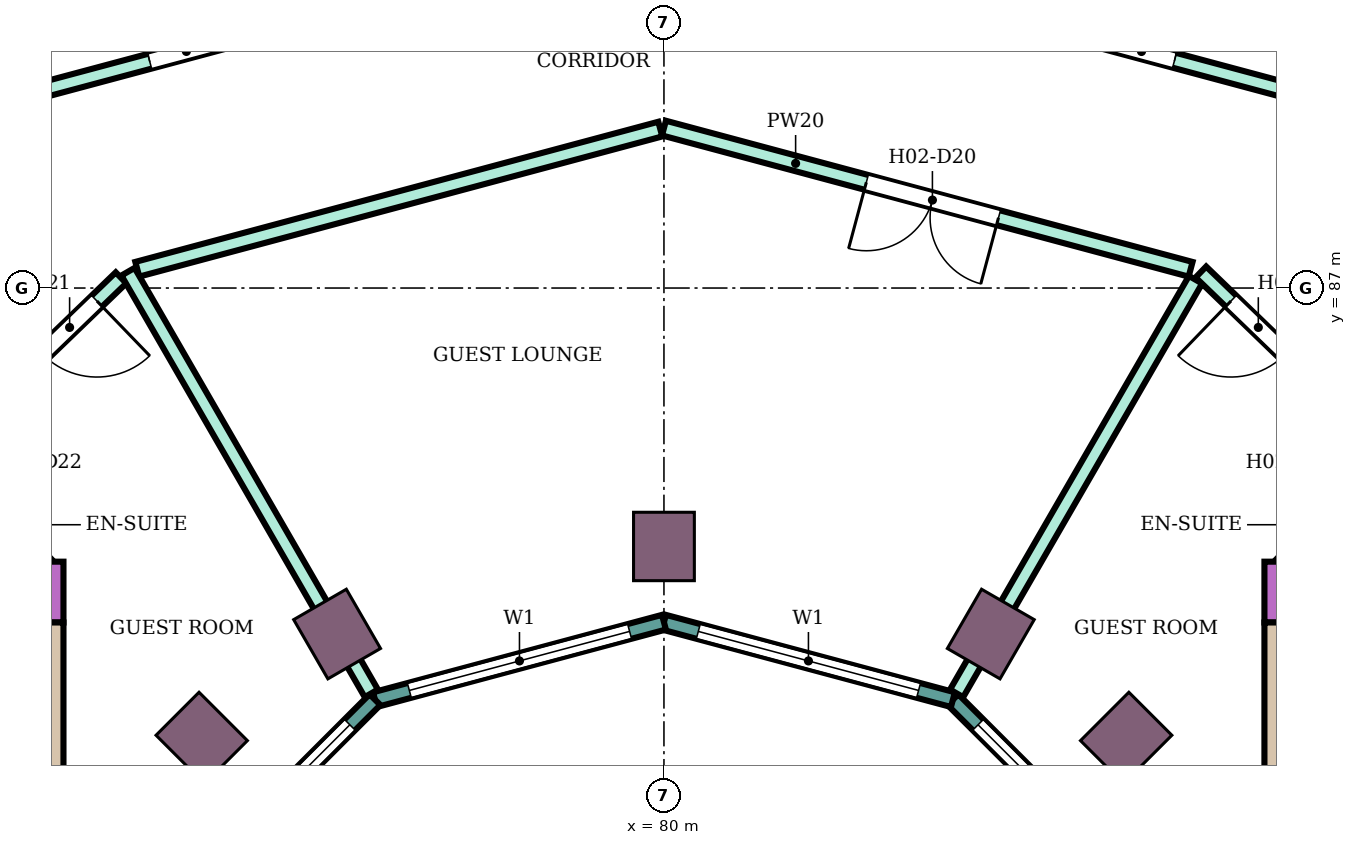
"""IFC4 building model, lengths in metres.
Left out: names, types, materials, properties, quantities, classifications, styles, units other than length and angle.
Written with IfcOpenShell. Run it as: python <this file> out.ifc"""

import sys

from ifc_helpers import new_model, si_unit, direction, frame, frame_2d, origin, origin_2d, place, context, subcontext, project, spatial, rectangle, extrude, element, fill, save


model = new_model("IFC4")
c1 = context("Model", 3, precision=1e-05, world=origin(), true_north=direction((0.0, 1.0)))
c2 = subcontext(c1, "Body", "Model", "MODEL_VIEW")
j1 = project(units=[si_unit("LENGTHUNIT", "METRE"), si_unit("PLANEANGLEUNIT", "RADIAN")], contexts=[c1])
p1 = place(None, origin())
s1 = spatial("IfcSite", under=j1, at=p1, CompositionType="ELEMENT")
p2 = place(p1, origin())
s2 = spatial("IfcBuilding", under=s1, at=p2, CompositionType="ELEMENT")
p3 = place(p2, frame((0.0, 0.0, 47.8)))
s3 = spatial("IfcBuildingStorey", under=s2, at=p3, CompositionType="ELEMENT", Elevation=47.8)
for number, where, z_axis, x_axis in (
    (1, (86.081, 81.081, 0.0), (0.0, 0.0, 1.0), (0.707, 0.707, 0.0)),
    (2, (84.3, 82.448, 0.0), (0.0, 0.0, 1.0), (0.5, 0.866, 0.0)),
    (3, (80.0, 83.6, 0.0), (0.0, 0.0, 1.0), (0.0, 1.0, 0.0)),
    (4, (75.7, 82.448, 0.0), (0.0, 0.0, 1.0), (-0.5, 0.866, 0.0)),
    (5, (73.919, 81.081, 0.0), (0.0, 0.0, 1.0), (-0.707, 0.707, 0.0)),
):
    element("IfcColumn", number, at=place(p3, frame(where, z_axis=z_axis, x_axis=x_axis)), inside=s3, PredefinedType="COLUMN", context=c2, shape_type="SweptSolid", body=[
        extrude(rectangle(XDim=0.9, YDim=0.8, at=origin_2d()), origin(), (0.0, 0.0, 1.0), 3.8),
    ])
p4 = place(p3, frame((87.9, 83.0, 0.0), z_axis=(0.0, 0.0, 1.0), x_axis=(1.0, 0.0, 0.0)))
e6 = element("IfcWall", 6, at=p4, inside=s3, PredefinedType="SHEAR", context=c2, shape_type="SweptSolid", body=[
    extrude(rectangle(XDim=14.7, YDim=0.8, at=frame_2d((7.35, 0.0))), origin(), (0.0, 0.0, 1.0), 3.48),
])
p5 = place(p4, frame((4.2, 0.0, 0.0)))
e7 = element("IfcOpeningElement", 7, at=p5, cuts=e6, PredefinedType="OPENING", context=c2, shape_type="SweptSolid", body=[
    extrude(rectangle(XDim=2.4, YDim=2.4, at=frame_2d((1.2, 1.2))), frame((0.0, 0.41, 0.0), z_axis=(0.0, -1.0, 0.0), x_axis=(1.0, 0.0, 0.0)), (0.0, 0.0, 1.0), 0.82),
])
p6 = place(p3, frame((88.125, 75.0, 0.0), z_axis=(0.0, 0.0, 1.0), x_axis=(0.0, 1.0, 0.0)))
e8 = element("IfcWall", 8, at=p6, inside=s3, PredefinedType="SHEAR", context=c2, shape_type="SweptSolid", body=[
    extrude(rectangle(XDim=7.6, YDim=0.45, at=frame_2d((3.8, 0.0))), origin(), (0.0, 0.0, 1.0), 3.48),
])
p7 = place(p3, frame((72.1, 83.0, 0.0), z_axis=(0.0, 0.0, 1.0), x_axis=(-1.0, 0.0, 0.0)))
e9 = element("IfcWall", 9, at=p7, inside=s3, PredefinedType="SHEAR", context=c2, shape_type="SweptSolid", body=[
    extrude(rectangle(XDim=14.7, YDim=0.8, at=frame_2d((7.35, 0.0))), origin(), (0.0, 0.0, 1.0), 3.48),
])
p8 = place(p7, frame((4.2, 0.0, 0.0)))
e10 = element("IfcOpeningElement", 10, at=p8, cuts=e9, PredefinedType="OPENING", context=c2, shape_type="SweptSolid", body=[
    extrude(rectangle(XDim=2.4, YDim=2.4, at=frame_2d((1.2, 1.2))), frame((0.0, 0.41, 0.0), z_axis=(0.0, -1.0, 0.0), x_axis=(1.0, 0.0, 0.0)), (0.0, 0.0, 1.0), 0.82),
])
p9 = place(p3, frame((71.875, 82.6, 0.0), z_axis=(0.0, 0.0, 1.0), x_axis=(0.0, -1.0, 0.0)))
e11 = element("IfcWall", 11, at=p9, inside=s3, PredefinedType="SHEAR", context=c2, shape_type="SweptSolid", body=[
    extrude(rectangle(XDim=7.6, YDim=0.45, at=frame_2d((3.8, 0.0))), origin(), (0.0, 0.0, 1.0), 3.48),
])
p10 = place(p3, frame((86.585, 78.802, 0.0), z_axis=(0.0, 0.0, 1.0), x_axis=(-0.707106781187, 0.707106781187, 0.0)))
e12 = element("IfcWall", 12, at=p10, inside=s3, PredefinedType="NOTDEFINED", context=c2, shape_type="SweptSolid", body=[
    extrude(rectangle(XDim=3.936, YDim=0.2, at=frame_2d((1.968, 0.0))), origin(), (0.0, 0.0, 1.0), 3.8),
])
p11 = place(p10, frame((0.468, 0.0, 0.9)))
e13 = element("IfcOpeningElement", 13, at=p11, cuts=e12, PredefinedType="OPENING", context=c2, shape_type="SweptSolid", body=[
    extrude(rectangle(XDim=3.0, YDim=2.3, at=frame_2d((1.5, 1.15))), frame((0.0, 0.11, 0.0), z_axis=(0.0, -1.0, 0.0), x_axis=(1.0, 0.0, 0.0)), (0.0, 0.0, 1.0), 0.22),
])
p12 = place(p3, frame((83.802, 81.585, 0.0), z_axis=(0.0, 0.0, 1.0), x_axis=(-0.965933654434, 0.258789828301, 0.0)))
e14 = element("IfcWall", 14, at=p12, inside=s3, PredefinedType="NOTDEFINED", context=c2, shape_type="SweptSolid", body=[
    extrude(rectangle(XDim=3.936, YDim=0.2, at=frame_2d((1.968, 0.0))), origin(), (0.0, 0.0, 1.0), 3.8),
])
p13 = place(p12, frame((0.468, 0.0, 0.9)))
e15 = element("IfcOpeningElement", 15, at=p13, cuts=e14, PredefinedType="OPENING", context=c2, shape_type="SweptSolid", body=[
    extrude(rectangle(XDim=3.0, YDim=2.3, at=frame_2d((1.5, 1.15))), frame((0.0, 0.11, 0.0), z_axis=(0.0, -1.0, 0.0), x_axis=(1.0, 0.0, 0.0)), (0.0, 0.0, 1.0), 0.22),
])
p14 = place(p3, frame((80.0, 82.604, 0.0), z_axis=(0.0, 0.0, 1.0), x_axis=(-0.965933654434, -0.258789828301, 0.0)))
e16 = element("IfcWall", 16, at=p14, inside=s3, PredefinedType="NOTDEFINED", context=c2, shape_type="SweptSolid", body=[
    extrude(rectangle(XDim=3.936, YDim=0.2, at=frame_2d((1.968, 0.0))), origin(), (0.0, 0.0, 1.0), 3.8),
])
p15 = place(p14, frame((0.468, 0.0, 0.9)))
e17 = element("IfcOpeningElement", 17, at=p15, cuts=e16, PredefinedType="OPENING", context=c2, shape_type="SweptSolid", body=[
    extrude(rectangle(XDim=3.0, YDim=2.3, at=frame_2d((1.5, 1.15))), frame((0.0, 0.11, 0.0), z_axis=(0.0, -1.0, 0.0), x_axis=(1.0, 0.0, 0.0)), (0.0, 0.0, 1.0), 0.22),
])
p16 = place(p3, frame((76.198, 81.585, 0.0), z_axis=(0.0, 0.0, 1.0), x_axis=(-0.707106781187, -0.707106781187, 0.0)))
e18 = element("IfcWall", 18, at=p16, inside=s3, PredefinedType="NOTDEFINED", context=c2, shape_type="SweptSolid", body=[
    extrude(rectangle(XDim=3.936, YDim=0.2, at=frame_2d((1.968, 0.0))), origin(), (0.0, 0.0, 1.0), 3.8),
])
p17 = place(p16, frame((0.468, 0.0, 0.9)))
e19 = element("IfcOpeningElement", 19, at=p17, cuts=e18, PredefinedType="OPENING", context=c2, shape_type="SweptSolid", body=[
    extrude(rectangle(XDim=3.0, YDim=2.3, at=frame_2d((1.5, 1.15))), frame((0.0, 0.11, 0.0), z_axis=(0.0, -1.0, 0.0), x_axis=(1.0, 0.0, 0.0)), (0.0, 0.0, 1.0), 0.22),
])
p18 = place(p3, frame((68.987, 83.4, 0.0), z_axis=(0.0, 0.0, 1.0), x_axis=(0.719591503389, 0.694397629784, 0.0)))
e20 = element("IfcWall", 20, at=p18, inside=s3, PredefinedType="PARTITIONING", context=c2, shape_type="SweptSolid", body=[
    extrude(rectangle(XDim=5.378, YDim=0.2, at=frame_2d((2.689, 0.0))), origin(), (0.0, 0.0, 1.0), 3.35),
])
p19 = place(p18, frame((3.938, 0.0, 0.0)))
e21 = element("IfcOpeningElement", 21, at=p19, cuts=e20, PredefinedType="OPENING", context=c2, shape_type="SweptSolid", body=[
    extrude(rectangle(XDim=1.0, YDim=2.1, at=frame_2d((0.5, 1.05))), frame((0.0, 0.11, 0.0), z_axis=(0.0, -1.0, 0.0), x_axis=(1.0, 0.0, 0.0)), (0.0, 0.0, 1.0), 0.22),
])
p20 = place(p3, frame((71.614, 89.55, 0.0), z_axis=(0.0, 0.0, 1.0), x_axis=(0.96597505802, 0.258635239832, 0.0)))
e22 = element("IfcWall", 22, at=p20, inside=s3, PredefinedType="PARTITIONING", context=c2, shape_type="SweptSolid", body=[
    extrude(rectangle(XDim=8.592, YDim=0.2, at=frame_2d((4.296, 0.0))), origin(), (0.0, 0.0, 1.0), 3.35),
])
p21 = place(p20, frame((4.865, 0.0, 0.0)))
e23 = element("IfcOpeningElement", 23, at=p21, cuts=e22, PredefinedType="OPENING", context=c2, shape_type="SweptSolid", body=[
    extrude(rectangle(XDim=1.0, YDim=2.1, at=frame_2d((0.5, 1.05))), frame((0.0, 0.11, 0.0), z_axis=(0.0, -1.0, 0.0), x_axis=(1.0, 0.0, 0.0)), (0.0, 0.0, 1.0), 0.22),
])
p22 = place(p20, frame((1.677, 0.0, 0.0)))
e24 = element("IfcOpeningElement", 24, at=p22, cuts=e22, PredefinedType="OPENING", context=c2, shape_type="SweptSolid", body=[
    extrude(rectangle(XDim=1.0, YDim=2.1, at=frame_2d((0.5, 1.05))), frame((0.0, 0.11, 0.0), z_axis=(0.0, -1.0, 0.0), x_axis=(1.0, 0.0, 0.0)), (0.0, 0.0, 1.0), 0.22),
])
p23 = place(p3, frame((73.071, 87.247, 0.0), z_axis=(0.0, 0.0, 1.0), x_axis=(0.965920206274, 0.258840018373, 0.0)))
e25 = element("IfcWall", 25, at=p23, inside=s3, PredefinedType="PARTITIONING", context=c2, shape_type="SweptSolid", body=[
    extrude(rectangle(XDim=7.123, YDim=0.2, at=frame_2d((3.562, 0.0))), origin(), (0.0, 0.0, 1.0), 3.35),
])
p24 = place(p3, frame((72.949, 87.215, 0.0), z_axis=(0.0, 0.0, 1.0), x_axis=(0.499890755261, -0.866088467077, 0.0)))
e26 = element("IfcWall", 26, at=p24, inside=s3, PredefinedType="PARTITIONING", context=c2, shape_type="SweptSolid", body=[
    extrude(rectangle(XDim=6.404, YDim=0.2, at=frame_2d((3.202, 0.0))), origin(), (0.0, 0.0, 1.0), 3.35),
])
p25 = place(p3, frame((80.0, 89.104, 0.0), z_axis=(0.0, 0.0, 1.0), x_axis=(0.965886659739, -0.258965172444, 0.0)))
e27 = element("IfcWall", 27, at=p25, inside=s3, PredefinedType="PARTITIONING", context=c2, shape_type="SweptSolid", body=[
    extrude(rectangle(XDim=7.173, YDim=0.2, at=frame_2d((3.587, 0.0))), origin(), (0.0, 0.0, 1.0), 3.35),
])
p26 = place(p25, frame((2.757, 0.0, 0.0)))
e28 = element("IfcOpeningElement", 28, at=p26, cuts=e27, PredefinedType="OPENING", context=c2, shape_type="SweptSolid", body=[
    extrude(rectangle(XDim=1.8, YDim=2.1, at=frame_2d((0.9, 1.05))), frame((0.0, 0.11, 0.0), z_axis=(0.0, -1.0, 0.0), x_axis=(1.0, 0.0, 0.0)), (0.0, 0.0, 1.0), 0.22),
])
p27 = place(p3, frame((80.0, 91.796, 0.0), z_axis=(0.0, 0.0, 1.0), x_axis=(0.965896351823, -0.258929020266, 0.0)))
e29 = element("IfcWall", 29, at=p27, inside=s3, PredefinedType="PARTITIONING", context=c2, shape_type="SweptSolid", body=[
    extrude(rectangle(XDim=8.602, YDim=0.2, at=frame_2d((4.301, 0.0))), origin(), (0.0, 0.0, 1.0), 3.35),
])
p28 = place(p27, frame((6.055, 0.0, 0.0)))
e30 = element("IfcOpeningElement", 30, at=p28, cuts=e29, PredefinedType="OPENING", context=c2, shape_type="SweptSolid", body=[
    extrude(rectangle(XDim=0.9, YDim=2.1, at=frame_2d((0.45, 1.05))), frame((0.0, 0.11, 0.0), z_axis=(0.0, -1.0, 0.0), x_axis=(1.0, 0.0, 0.0)), (0.0, 0.0, 1.0), 0.22),
])
p29 = place(p27, frame((2.817, 0.0, 0.0)))
e31 = element("IfcOpeningElement", 31, at=p29, cuts=e29, PredefinedType="OPENING", context=c2, shape_type="SweptSolid", body=[
    extrude(rectangle(XDim=1.0, YDim=2.1, at=frame_2d((0.5, 1.05))), frame((0.0, 0.11, 0.0), z_axis=(0.0, -1.0, 0.0), x_axis=(1.0, 0.0, 0.0)), (0.0, 0.0, 1.0), 0.22),
])
p30 = place(p3, frame((83.85, 81.668, 0.0), z_axis=(0.0, 0.0, 1.0), x_axis=(0.500233583443, 0.865890502313, 0.0)))
e32 = element("IfcWall", 32, at=p30, inside=s3, PredefinedType="PARTITIONING", context=c2, shape_type="SweptSolid", body=[
    extrude(rectangle(XDim=6.284, YDim=0.2, at=frame_2d((3.142, 0.0))), origin(), (0.0, 0.0, 1.0), 3.35),
])
p31 = place(p3, frame((87.064, 87.211, 0.0), z_axis=(0.0, 0.0, 1.0), x_axis=(0.719540958932, -0.694450004262, 0.0)))
e33 = element("IfcWall", 33, at=p31, inside=s3, PredefinedType="PARTITIONING", context=c2, shape_type="SweptSolid", body=[
    extrude(rectangle(XDim=5.488, YDim=0.2, at=frame_2d((2.744, 0.0))), origin(), (0.0, 0.0, 1.0), 3.35),
])
p32 = place(p31, frame((0.55, 0.0, 0.0)))
e34 = element("IfcOpeningElement", 34, at=p32, cuts=e33, PredefinedType="OPENING", context=c2, shape_type="SweptSolid", body=[
    extrude(rectangle(XDim=1.0, YDim=2.1, at=frame_2d((0.5, 1.05))), frame((0.0, 0.11, 0.0), z_axis=(0.0, -1.0, 0.0), x_axis=(1.0, 0.0, 0.0)), (0.0, 0.0, 1.0), 0.22),
])
p33 = place(p11, origin())
e35 = element("IfcWindow", 35, at=p33, inside=s3, PartitioningType="SINGLE_PANEL", PredefinedType="WINDOW", context=c2, shape_type="SweptSolid", body=[
    extrude(rectangle(XDim=3.0, YDim=2.3, at=frame_2d((1.5, 1.15))), frame((0.0, 0.03, 0.0), z_axis=(0.0, -1.0, 0.0), x_axis=(1.0, 0.0, 0.0)), (0.0, 0.0, 1.0), 0.06),
])
fill(e13, e35)
p34 = place(p13, origin())
e36 = element("IfcWindow", 36, at=p34, inside=s3, PartitioningType="SINGLE_PANEL", PredefinedType="WINDOW", context=c2, shape_type="SweptSolid", body=[
    extrude(rectangle(XDim=3.0, YDim=2.3, at=frame_2d((1.5, 1.15))), frame((0.0, 0.03, 0.0), z_axis=(0.0, -1.0, 0.0), x_axis=(1.0, 0.0, 0.0)), (0.0, 0.0, 1.0), 0.06),
])
fill(e15, e36)
p35 = place(p15, origin())
e37 = element("IfcWindow", 37, at=p35, inside=s3, PartitioningType="SINGLE_PANEL", PredefinedType="WINDOW", context=c2, shape_type="SweptSolid", body=[
    extrude(rectangle(XDim=3.0, YDim=2.3, at=frame_2d((1.5, 1.15))), frame((0.0, 0.03, 0.0), z_axis=(0.0, -1.0, 0.0), x_axis=(1.0, 0.0, 0.0)), (0.0, 0.0, 1.0), 0.06),
])
fill(e17, e37)
p36 = place(p17, origin())
e38 = element("IfcWindow", 38, at=p36, inside=s3, PartitioningType="SINGLE_PANEL", PredefinedType="WINDOW", context=c2, shape_type="SweptSolid", body=[
    extrude(rectangle(XDim=3.0, YDim=2.3, at=frame_2d((1.5, 1.15))), frame((0.0, 0.03, 0.0), z_axis=(0.0, -1.0, 0.0), x_axis=(1.0, 0.0, 0.0)), (0.0, 0.0, 1.0), 0.06),
])
fill(e19, e38)
p37 = place(p28, origin())
e39 = element("IfcDoor", 39, at=p37, inside=s3, OperationType="SINGLE_SWING_LEFT", PredefinedType="DOOR", context=c2, shape_type="SweptSolid", body=[
    extrude(rectangle(XDim=0.9, YDim=2.1, at=frame_2d((0.45, 1.05))), frame((0.0, 0.025, 0.0), z_axis=(0.0, -1.0, 0.0), x_axis=(1.0, 0.0, 0.0)), (0.0, 0.0, 1.0), 0.05),
])
fill(e30, e39)
p38 = place(p22, origin())
e40 = element("IfcDoor", 40, at=p38, inside=s3, OperationType="SINGLE_SWING_RIGHT", PredefinedType="DOOR", context=c2, shape_type="SweptSolid", body=[
    extrude(rectangle(XDim=1.0, YDim=2.1, at=frame_2d((0.5, 1.05))), frame((0.0, 0.025, 0.0), z_axis=(0.0, -1.0, 0.0), x_axis=(1.0, 0.0, 0.0)), (0.0, 0.0, 1.0), 0.05),
])
fill(e24, e40)
p39 = place(p32, frame((1.0, 0.0, 0.0), z_axis=(0.0, 0.0, 1.0), x_axis=(-1.0, 0.0, 0.0)))
e41 = element("IfcDoor", 41, at=p39, inside=s3, OperationType="SINGLE_SWING_RIGHT", PredefinedType="DOOR", context=c2, shape_type="SweptSolid", body=[
    extrude(rectangle(XDim=1.0, YDim=2.1, at=frame_2d((0.5, 1.05))), frame((0.0, 0.025, 0.0), z_axis=(0.0, -1.0, 0.0), x_axis=(1.0, 0.0, 0.0)), (0.0, 0.0, 1.0), 0.05),
])
fill(e34, e41)
p40 = place(p26, frame((1.8, 0.0, 0.0), z_axis=(0.0, 0.0, 1.0), x_axis=(-1.0, 0.0, 0.0)))
e42 = element("IfcDoor", 42, at=p40, inside=s3, OperationType="DOUBLE_DOOR_SINGLE_SWING", PredefinedType="DOOR", context=c2, shape_type="SweptSolid", body=[
    extrude(rectangle(XDim=1.8, YDim=2.1, at=frame_2d((0.9, 1.05))), frame((0.0, 0.025, 0.0), z_axis=(0.0, -1.0, 0.0), x_axis=(1.0, 0.0, 0.0)), (0.0, 0.0, 1.0), 0.05),
])
fill(e28, e42)
p41 = place(p19, frame((1.0, 0.0, 0.0), z_axis=(0.0, 0.0, 1.0), x_axis=(-1.0, 0.0, 0.0)))
e43 = element("IfcDoor", 43, at=p41, inside=s3, OperationType="SINGLE_SWING_LEFT", PredefinedType="DOOR", context=c2, shape_type="SweptSolid", body=[
    extrude(rectangle(XDim=1.0, YDim=2.1, at=frame_2d((0.5, 1.05))), frame((0.0, 0.025, 0.0), z_axis=(0.0, -1.0, 0.0), x_axis=(1.0, 0.0, 0.0)), (0.0, 0.0, 1.0), 0.05),
])
fill(e21, e43)
save(model, sys.argv[1])
